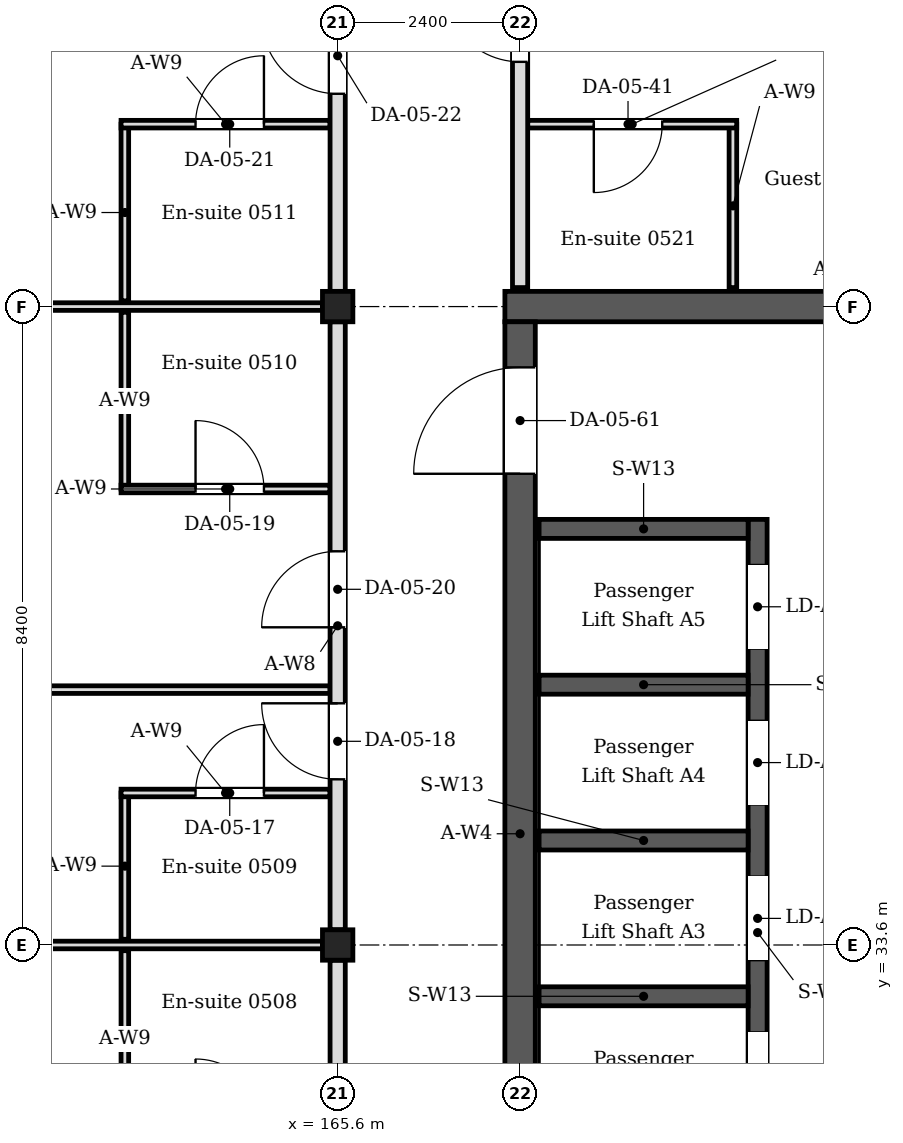
"""IFC4 building model, lengths in metres.
Left out: names, types, materials, properties, quantities, classifications, styles, units other than length and angle.
Written with IfcOpenShell. Run it as: python <this file> out.ifc"""

import sys

from ifc_helpers import new_model, si_unit, direction, frame, frame_2d, origin, origin_2d, place, context, subcontext, project, spatial, rectangle, i_section, extrude, element, fill, save


model = new_model("IFC4")
c1 = context("Model", 3, precision=1e-05, world=origin(), true_north=direction((0.0, 1.0)))
c2 = subcontext(c1, "Body", "Model", "MODEL_VIEW")
j1 = project(units=[si_unit("LENGTHUNIT", "METRE"), si_unit("PLANEANGLEUNIT", "RADIAN")], contexts=[c1])
p1 = place(None, origin())
s1 = spatial("IfcSite", under=j1, at=p1, CompositionType="ELEMENT")
p2 = place(p1, origin())
s2 = spatial("IfcBuilding", under=s1, at=p2, CompositionType="ELEMENT")
p3 = place(p2, frame((0.0, 0.0, 22.8)))
s3 = spatial("IfcBuildingStorey", under=s2, at=p3, CompositionType="ELEMENT", Elevation=22.8)
for number, where, z_axis, x_axis in (
    (1, (165.6, 33.6, 0.0), (0.0, 0.0, 1.0), (1.0, 0.0, 0.0)),
    (2, (165.6, 42.0, 0.0), (0.0, 0.0, 1.0), (1.0, 0.0, 0.0)),
):
    element("IfcColumn", number, at=place(p3, frame(where, z_axis=z_axis, x_axis=x_axis)), inside=s3, PredefinedType="COLUMN", context=c2, shape_type="SweptSolid", body=[
        extrude(i_section(OverallWidth=0.4, OverallDepth=0.4, WebThickness=0.013, FlangeThickness=0.021, FilletRadius=0.022, at=origin_2d()), origin(), (0.0, 0.0, 1.0), 4.2),
    ])
p4 = place(p3, frame((167.8, 42.0, 0.0), z_axis=(0.0, 0.0, 1.0), x_axis=(1.0, 0.0, 0.0)))
e3 = element("IfcWall", 3, at=p4, inside=s3, PredefinedType="SOLIDWALL", context=c2, shape_type="SweptSolid", body=[
    extrude(rectangle(XDim=8.8, YDim=0.4, at=frame_2d((4.4, 0.0))), origin(), (0.0, 0.0, 1.0), 4.05),
])
p5 = place(p3, frame((168.0, 25.4, 0.0), z_axis=(0.0, 0.0, 1.0), x_axis=(0.0, 1.0, 0.0)))
e4 = element("IfcWall", 4, at=p5, inside=s3, PredefinedType="SOLIDWALL", context=c2, shape_type="SweptSolid", body=[
    extrude(rectangle(XDim=16.4, YDim=0.4, at=frame_2d((8.2, 0.0))), origin(), (0.0, 0.0, 1.0), 4.05),
])
p6 = place(p5, frame((1.0, 0.0, 0.0)))
e5 = element("IfcOpeningElement", 5, at=p6, cuts=e4, PredefinedType="OPENING", context=c2, shape_type="SweptSolid", body=[
    extrude(rectangle(XDim=1.0, YDim=2.1, at=frame_2d((0.5, 1.05))), frame((0.0, 0.21, 0.0), z_axis=(0.0, -1.0, 0.0), x_axis=(1.0, 0.0, 0.0)), (0.0, 0.0, 1.0), 0.42),
])
p7 = place(p5, frame((14.4, 0.0, 0.0)))
e6 = element("IfcOpeningElement", 6, at=p7, cuts=e4, PredefinedType="OPENING", context=c2, shape_type="SweptSolid", body=[
    extrude(rectangle(XDim=1.4, YDim=2.1, at=frame_2d((0.7, 1.05))), frame((0.0, 0.21, 0.0), z_axis=(0.0, -1.0, 0.0), x_axis=(1.0, 0.0, 0.0)), (0.0, 0.0, 1.0), 0.42),
])
p8 = place(p3, frame((162.8, 31.2, 0.0), z_axis=(0.0, 0.0, 1.0), x_axis=(0.0, 1.0, 0.0)))
e7 = element("IfcWall", 7, at=p8, inside=s3, PredefinedType="PARTITIONING", context=c2, shape_type="SweptSolid", body=[
    extrude(rectangle(XDim=2.325, YDim=0.1, at=frame_2d((1.163, 0.0))), origin(), (0.0, 0.0, 1.0), 4.05),
])
p9 = place(p3, frame((162.8, 33.675, 0.0), z_axis=(0.0, 0.0, 1.0), x_axis=(0.0, 1.0, 0.0)))
e8 = element("IfcWall", 8, at=p9, inside=s3, PredefinedType="PARTITIONING", context=c2, shape_type="SweptSolid", body=[
    extrude(rectangle(XDim=1.925, YDim=0.1, at=frame_2d((0.962, 0.0))), origin(), (0.0, 0.0, 1.0), 4.05),
])
p10 = place(p3, frame((162.75, 35.6, 0.0), z_axis=(0.0, 0.0, 1.0), x_axis=(1.0, 0.0, 0.0)))
e9 = element("IfcWall", 9, at=p10, inside=s3, PredefinedType="PARTITIONING", context=c2, shape_type="SweptSolid", body=[
    extrude(rectangle(XDim=2.75, YDim=0.1, at=frame_2d((1.375, 0.0))), origin(), (0.0, 0.0, 1.0), 4.05),
])
p11 = place(p10, frame((0.98, 0.0, 0.0)))
e10 = element("IfcOpeningElement", 10, at=p11, cuts=e9, PredefinedType="OPENING", context=c2, shape_type="SweptSolid", body=[
    extrude(rectangle(XDim=0.9, YDim=2.1, at=frame_2d((0.45, 1.05))), frame((0.0, 0.06, 0.0), z_axis=(0.0, -1.0, 0.0), x_axis=(1.0, 0.0, 0.0)), (0.0, 0.0, 1.0), 0.12),
])
p12 = place(p3, frame((162.8, 39.6, 0.0), z_axis=(0.0, 0.0, 1.0), x_axis=(0.0, 1.0, 0.0)))
e11 = element("IfcWall", 11, at=p12, inside=s3, PredefinedType="PARTITIONING", context=c2, shape_type="SweptSolid", body=[
    extrude(rectangle(XDim=2.325, YDim=0.1, at=frame_2d((1.163, 0.0))), origin(), (0.0, 0.0, 1.0), 4.05),
])
p13 = place(p3, frame((162.75, 39.6, 0.0), z_axis=(0.0, 0.0, 1.0), x_axis=(1.0, 0.0, 0.0)))
e12 = element("IfcWall", 12, at=p13, inside=s3, PredefinedType="PARTITIONING", context=c2, shape_type="SweptSolid", body=[
    extrude(rectangle(XDim=2.75, YDim=0.1, at=frame_2d((1.375, 0.0))), origin(), (0.0, 0.0, 1.0), 4.05),
])
p14 = place(p13, frame((0.98, 0.0, 0.0)))
e13 = element("IfcOpeningElement", 13, at=p14, cuts=e12, PredefinedType="OPENING", context=c2, shape_type="SweptSolid", body=[
    extrude(rectangle(XDim=0.9, YDim=2.1, at=frame_2d((0.45, 1.05))), frame((0.0, 0.06, 0.0), z_axis=(0.0, -1.0, 0.0), x_axis=(1.0, 0.0, 0.0)), (0.0, 0.0, 1.0), 0.12),
])
p15 = place(p3, frame((162.8, 42.075, 0.0), z_axis=(0.0, 0.0, 1.0), x_axis=(0.0, 1.0, 0.0)))
e14 = element("IfcWall", 14, at=p15, inside=s3, PredefinedType="PARTITIONING", context=c2, shape_type="SweptSolid", body=[
    extrude(rectangle(XDim=2.325, YDim=0.1, at=frame_2d((1.163, 0.0))), origin(), (0.0, 0.0, 1.0), 4.05),
])
p16 = place(p3, frame((162.75, 44.4, 0.0), z_axis=(0.0, 0.0, 1.0), x_axis=(1.0, 0.0, 0.0)))
e15 = element("IfcWall", 15, at=p16, inside=s3, PredefinedType="PARTITIONING", context=c2, shape_type="SweptSolid", body=[
    extrude(rectangle(XDim=2.75, YDim=0.1, at=frame_2d((1.375, 0.0))), origin(), (0.0, 0.0, 1.0), 4.05),
])
p17 = place(p16, frame((0.98, 0.0, 0.0)))
e16 = element("IfcOpeningElement", 16, at=p17, cuts=e15, PredefinedType="OPENING", context=c2, shape_type="SweptSolid", body=[
    extrude(rectangle(XDim=0.9, YDim=2.1, at=frame_2d((0.45, 1.05))), frame((0.0, 0.06, 0.0), z_axis=(0.0, -1.0, 0.0), x_axis=(1.0, 0.0, 0.0)), (0.0, 0.0, 1.0), 0.12),
])
p18 = place(p3, frame((170.8, 42.25, 0.0), z_axis=(0.0, 0.0, 1.0), x_axis=(0.0, 1.0, 0.0)))
e17 = element("IfcWall", 17, at=p18, inside=s3, PredefinedType="PARTITIONING", context=c2, shape_type="SweptSolid", body=[
    extrude(rectangle(XDim=2.15, YDim=0.1, at=frame_2d((1.075, 0.0))), origin(), (0.0, 0.0, 1.0), 4.05),
])
p19 = place(p3, frame((170.85, 44.4, 0.0), z_axis=(0.0, 0.0, 1.0), x_axis=(-1.0, 0.0, 0.0)))
e18 = element("IfcWall", 18, at=p19, inside=s3, PredefinedType="PARTITIONING", context=c2, shape_type="SweptSolid", body=[
    extrude(rectangle(XDim=2.75, YDim=0.1, at=frame_2d((1.375, 0.0))), origin(), (0.0, 0.0, 1.0), 4.05),
])
p20 = place(p19, frame((0.98, 0.0, 0.0)))
e19 = element("IfcOpeningElement", 19, at=p20, cuts=e18, PredefinedType="OPENING", context=c2, shape_type="SweptSolid", body=[
    extrude(rectangle(XDim=0.9, YDim=2.1, at=frame_2d((0.45, 1.05))), frame((0.0, 0.06, 0.0), z_axis=(0.0, -1.0, 0.0), x_axis=(1.0, 0.0, 0.0)), (0.0, 0.0, 1.0), 0.12),
])
for number, where, z_axis, x_axis in (
    (20, (157.4, 33.6, 0.0), (0.0, 0.0, 1.0), (1.0, 0.0, 0.0)),
    (21, (157.4, 42.0, 0.0), (0.0, 0.0, 1.0), (1.0, 0.0, 0.0)),
):
    element("IfcWall", number, at=place(p3, frame(where, z_axis=z_axis, x_axis=x_axis)), inside=s3, PredefinedType="PARTITIONING", context=c2, shape_type="SweptSolid", body=[
        extrude(rectangle(XDim=8.0, YDim=0.1, at=frame_2d((4.0, 0.0))), origin(), (0.0, 0.0, 1.0), 3.604),
    ])
p21 = place(p3, frame((156.98, 36.96, 0.0), z_axis=(0.0, 0.0, 1.0), x_axis=(1.0, 0.0, 0.0)))
e22 = element("IfcWall", 22, at=p21, inside=s3, PredefinedType="PARTITIONING", context=c2, shape_type="SweptSolid", body=[
    extrude(rectangle(XDim=8.52, YDim=0.1, at=frame_2d((4.26, 0.0))), origin(), (0.0, 0.0, 1.0), 3.604),
])
p22 = place(p3, frame((165.6, 25.4, 0.0), z_axis=(0.0, 0.0, 1.0), x_axis=(0.0, 1.0, 0.0)))
e23 = element("IfcWall", 23, at=p22, inside=s3, PredefinedType="PARTITIONING", context=c2, shape_type="SweptSolid", body=[
    extrude(rectangle(XDim=8.0, YDim=0.2, at=frame_2d((4.0, 0.0))), origin(), (0.0, 0.0, 1.0), 3.45),
])
p23 = place(p22, frame((1.98, 0.0, 0.0)))
e24 = element("IfcOpeningElement", 24, at=p23, cuts=e23, PredefinedType="OPENING", context=c2, shape_type="SweptSolid", body=[
    extrude(rectangle(XDim=1.0, YDim=2.4, at=frame_2d((0.5, 1.2))), frame((0.0, 0.11, 0.0), z_axis=(0.0, -1.0, 0.0), x_axis=(1.0, 0.0, 0.0)), (0.0, 0.0, 1.0), 0.22),
])
p24 = place(p22, frame((3.98, 0.0, 0.0)))
e25 = element("IfcOpeningElement", 25, at=p24, cuts=e23, PredefinedType="OPENING", context=c2, shape_type="SweptSolid", body=[
    extrude(rectangle(XDim=1.0, YDim=2.4, at=frame_2d((0.5, 1.2))), frame((0.0, 0.11, 0.0), z_axis=(0.0, -1.0, 0.0), x_axis=(1.0, 0.0, 0.0)), (0.0, 0.0, 1.0), 0.22),
])
p25 = place(p3, frame((165.6, 33.8, 0.0), z_axis=(0.0, 0.0, 1.0), x_axis=(0.0, 1.0, 0.0)))
e26 = element("IfcWall", 26, at=p25, inside=s3, PredefinedType="PARTITIONING", context=c2, shape_type="SweptSolid", body=[
    extrude(rectangle(XDim=8.0, YDim=0.2, at=frame_2d((4.0, 0.0))), origin(), (0.0, 0.0, 1.0), 3.45),
])
p26 = place(p25, frame((1.98, 0.0, 0.0)))
e27 = element("IfcOpeningElement", 27, at=p26, cuts=e26, PredefinedType="OPENING", context=c2, shape_type="SweptSolid", body=[
    extrude(rectangle(XDim=1.0, YDim=2.4, at=frame_2d((0.5, 1.2))), frame((0.0, 0.11, 0.0), z_axis=(0.0, -1.0, 0.0), x_axis=(1.0, 0.0, 0.0)), (0.0, 0.0, 1.0), 0.22),
])
p27 = place(p25, frame((3.98, 0.0, 0.0)))
e28 = element("IfcOpeningElement", 28, at=p27, cuts=e26, PredefinedType="OPENING", context=c2, shape_type="SweptSolid", body=[
    extrude(rectangle(XDim=1.0, YDim=2.4, at=frame_2d((0.5, 1.2))), frame((0.0, 0.11, 0.0), z_axis=(0.0, -1.0, 0.0), x_axis=(1.0, 0.0, 0.0)), (0.0, 0.0, 1.0), 0.22),
])
p28 = place(p3, frame((165.6, 42.2, 0.0), z_axis=(0.0, 0.0, 1.0), x_axis=(0.0, 1.0, 0.0)))
e29 = element("IfcWall", 29, at=p28, inside=s3, PredefinedType="PARTITIONING", context=c2, shape_type="SweptSolid", body=[
    extrude(rectangle(XDim=8.0, YDim=0.2, at=frame_2d((4.0, 0.0))), origin(), (0.0, 0.0, 1.0), 3.45),
])
p29 = place(p28, frame((2.6, 0.0, 0.0)))
e30 = element("IfcOpeningElement", 30, at=p29, cuts=e29, PredefinedType="OPENING", context=c2, shape_type="SweptSolid", body=[
    extrude(rectangle(XDim=1.0, YDim=2.4, at=frame_2d((0.5, 1.2))), frame((0.0, 0.11, 0.0), z_axis=(0.0, -1.0, 0.0), x_axis=(1.0, 0.0, 0.0)), (0.0, 0.0, 1.0), 0.22),
])
p30 = place(p28, frame((4.4, 0.0, 0.0)))
e31 = element("IfcOpeningElement", 31, at=p30, cuts=e29, PredefinedType="OPENING", context=c2, shape_type="SweptSolid", body=[
    extrude(rectangle(XDim=1.0, YDim=2.4, at=frame_2d((0.5, 1.2))), frame((0.0, 0.11, 0.0), z_axis=(0.0, -1.0, 0.0), x_axis=(1.0, 0.0, 0.0)), (0.0, 0.0, 1.0), 0.22),
])
p31 = place(p3, frame((168.0, 42.25, 0.0), z_axis=(0.0, 0.0, 1.0), x_axis=(0.0, 1.0, 0.0)))
e32 = element("IfcWall", 32, at=p31, inside=s3, PredefinedType="PARTITIONING", context=c2, shape_type="SweptSolid", body=[
    extrude(rectangle(XDim=7.95, YDim=0.2, at=frame_2d((3.975, 0.0))), origin(), (0.0, 0.0, 1.0), 3.45),
])
p32 = place(p31, frame((2.97, 0.0, 0.0)))
e33 = element("IfcOpeningElement", 33, at=p32, cuts=e32, PredefinedType="OPENING", context=c2, shape_type="SweptSolid", body=[
    extrude(rectangle(XDim=1.0, YDim=2.4, at=frame_2d((0.5, 1.2))), frame((0.0, 0.11, 0.0), z_axis=(0.0, -1.0, 0.0), x_axis=(1.0, 0.0, 0.0)), (0.0, 0.0, 1.0), 0.22),
])
p33 = place(p31, frame((4.97, 0.0, 0.0)))
e34 = element("IfcOpeningElement", 34, at=p33, cuts=e32, PredefinedType="OPENING", context=c2, shape_type="SweptSolid", body=[
    extrude(rectangle(XDim=1.0, YDim=2.4, at=frame_2d((0.5, 1.2))), frame((0.0, 0.11, 0.0), z_axis=(0.0, -1.0, 0.0), x_axis=(1.0, 0.0, 0.0)), (0.0, 0.0, 1.0), 0.22),
])
p34 = place(p3, frame((171.125, 28.3, 0.0), z_axis=(0.0, 0.0, 1.0), x_axis=(0.0, 1.0, 0.0)))
e35 = element("IfcWall", 35, at=p34, inside=s3, PredefinedType="SOLIDWALL", context=c2, shape_type="SweptSolid", body=[
    extrude(rectangle(XDim=10.9, YDim=0.25, at=frame_2d((5.45, 0.0))), origin(), (0.0, 0.0, 1.0), 4.05),
])
p35 = place(p34, frame((0.8, 0.0, 0.0)))
e36 = element("IfcOpeningElement", 36, at=p35, cuts=e35, PredefinedType="OPENING", context=c2, shape_type="SweptSolid", body=[
    extrude(rectangle(XDim=1.1, YDim=2.1, at=frame_2d((0.55, 1.05))), frame((0.0, 0.135, 0.0), z_axis=(0.0, -1.0, 0.0), x_axis=(1.0, 0.0, 0.0)), (0.0, 0.0, 1.0), 0.27),
])
p36 = place(p34, frame((3.05, 0.0, 0.0)))
e37 = element("IfcOpeningElement", 37, at=p36, cuts=e35, PredefinedType="OPENING", context=c2, shape_type="SweptSolid", body=[
    extrude(rectangle(XDim=1.1, YDim=2.1, at=frame_2d((0.55, 1.05))), frame((0.0, 0.135, 0.0), z_axis=(0.0, -1.0, 0.0), x_axis=(1.0, 0.0, 0.0)), (0.0, 0.0, 1.0), 0.27),
])
p37 = place(p34, frame((5.1, 0.0, 0.0)))
e38 = element("IfcOpeningElement", 38, at=p37, cuts=e35, PredefinedType="OPENING", context=c2, shape_type="SweptSolid", body=[
    extrude(rectangle(XDim=1.1, YDim=2.1, at=frame_2d((0.55, 1.05))), frame((0.0, 0.135, 0.0), z_axis=(0.0, -1.0, 0.0), x_axis=(1.0, 0.0, 0.0)), (0.0, 0.0, 1.0), 0.27),
])
p38 = place(p34, frame((7.15, 0.0, 0.0)))
e39 = element("IfcOpeningElement", 39, at=p38, cuts=e35, PredefinedType="OPENING", context=c2, shape_type="SweptSolid", body=[
    extrude(rectangle(XDim=1.1, YDim=2.1, at=frame_2d((0.55, 1.05))), frame((0.0, 0.135, 0.0), z_axis=(0.0, -1.0, 0.0), x_axis=(1.0, 0.0, 0.0)), (0.0, 0.0, 1.0), 0.27),
])
p39 = place(p34, frame((9.2, 0.0, 0.0)))
e40 = element("IfcOpeningElement", 40, at=p39, cuts=e35, PredefinedType="OPENING", context=c2, shape_type="SweptSolid", body=[
    extrude(rectangle(XDim=1.1, YDim=2.1, at=frame_2d((0.55, 1.05))), frame((0.0, 0.135, 0.0), z_axis=(0.0, -1.0, 0.0), x_axis=(1.0, 0.0, 0.0)), (0.0, 0.0, 1.0), 0.27),
])
for number, where, z_axis, x_axis in (
    (41, (168.25, 32.925, 0.0), (0.0, 0.0, 1.0), (1.0, 0.0, 0.0)),
    (42, (168.25, 34.975, 0.0), (0.0, 0.0, 1.0), (1.0, 0.0, 0.0)),
    (43, (168.25, 37.025, 0.0), (0.0, 0.0, 1.0), (1.0, 0.0, 0.0)),
    (44, (168.25, 39.075, 0.0), (0.0, 0.0, 1.0), (1.0, 0.0, 0.0)),
):
    element("IfcWall", number, at=place(p3, frame(where, z_axis=z_axis, x_axis=x_axis)), inside=s3, PredefinedType="SOLIDWALL", context=c2, shape_type="SweptSolid", body=[
        extrude(rectangle(XDim=2.75, YDim=0.25, at=frame_2d((1.375, 0.0))), origin(), (0.0, 0.0, 1.0), 4.05),
    ])
p40 = place(p11, origin())
e45 = element("IfcDoor", 45, at=p40, inside=s3, OperationType="SINGLE_SWING_RIGHT", PredefinedType="DOOR", context=c2, shape_type="SweptSolid", body=[
    extrude(rectangle(XDim=0.9, YDim=2.1, at=frame_2d((0.45, 1.05))), frame((0.0, 0.025, 0.0), z_axis=(0.0, -1.0, 0.0), x_axis=(1.0, 0.0, 0.0)), (0.0, 0.0, 1.0), 0.05),
])
fill(e10, e45)
p41 = place(p26, origin())
e46 = element("IfcDoor", 46, at=p41, inside=s3, OperationType="SINGLE_SWING_RIGHT", PredefinedType="DOOR", context=c2, shape_type="SweptSolid", body=[
    extrude(rectangle(XDim=1.0, YDim=2.4, at=frame_2d((0.5, 1.2))), frame((0.0, 0.025, 0.0), z_axis=(0.0, -1.0, 0.0), x_axis=(1.0, 0.0, 0.0)), (0.0, 0.0, 1.0), 0.05),
])
fill(e27, e46)
p42 = place(p14, origin())
e47 = element("IfcDoor", 47, at=p42, inside=s3, OperationType="SINGLE_SWING_LEFT", PredefinedType="DOOR", context=c2, shape_type="SweptSolid", body=[
    extrude(rectangle(XDim=0.9, YDim=2.1, at=frame_2d((0.45, 1.05))), frame((0.0, 0.025, 0.0), z_axis=(0.0, -1.0, 0.0), x_axis=(1.0, 0.0, 0.0)), (0.0, 0.0, 1.0), 0.05),
])
fill(e13, e47)
p43 = place(p27, origin())
e48 = element("IfcDoor", 48, at=p43, inside=s3, OperationType="SINGLE_SWING_LEFT", PredefinedType="DOOR", context=c2, shape_type="SweptSolid", body=[
    extrude(rectangle(XDim=1.0, YDim=2.4, at=frame_2d((0.5, 1.2))), frame((0.0, 0.025, 0.0), z_axis=(0.0, -1.0, 0.0), x_axis=(1.0, 0.0, 0.0)), (0.0, 0.0, 1.0), 0.05),
])
fill(e28, e48)
p44 = place(p17, origin())
e49 = element("IfcDoor", 49, at=p44, inside=s3, OperationType="SINGLE_SWING_RIGHT", PredefinedType="DOOR", context=c2, shape_type="SweptSolid", body=[
    extrude(rectangle(XDim=0.9, YDim=2.1, at=frame_2d((0.45, 1.05))), frame((0.0, 0.025, 0.0), z_axis=(0.0, -1.0, 0.0), x_axis=(1.0, 0.0, 0.0)), (0.0, 0.0, 1.0), 0.05),
])
fill(e16, e49)
p45 = place(p29, origin())
e50 = element("IfcDoor", 50, at=p45, inside=s3, OperationType="SINGLE_SWING_RIGHT", PredefinedType="DOOR", context=c2, shape_type="SweptSolid", body=[
    extrude(rectangle(XDim=1.0, YDim=2.4, at=frame_2d((0.5, 1.2))), frame((0.0, 0.025, 0.0), z_axis=(0.0, -1.0, 0.0), x_axis=(1.0, 0.0, 0.0)), (0.0, 0.0, 1.0), 0.05),
])
fill(e30, e50)
p46 = place(p20, origin())
e51 = element("IfcDoor", 51, at=p46, inside=s3, OperationType="SINGLE_SWING_RIGHT", PredefinedType="DOOR", context=c2, shape_type="SweptSolid", body=[
    extrude(rectangle(XDim=0.9, YDim=2.1, at=frame_2d((0.45, 1.05))), frame((0.0, 0.025, 0.0), z_axis=(0.0, -1.0, 0.0), x_axis=(1.0, 0.0, 0.0)), (0.0, 0.0, 1.0), 0.05),
])
fill(e19, e51)
p47 = place(p32, origin())
e52 = element("IfcDoor", 52, at=p47, inside=s3, OperationType="SINGLE_SWING_RIGHT", PredefinedType="DOOR", context=c2, shape_type="SweptSolid", body=[
    extrude(rectangle(XDim=1.0, YDim=2.4, at=frame_2d((0.5, 1.2))), frame((0.0, 0.025, 0.0), z_axis=(0.0, -1.0, 0.0), x_axis=(1.0, 0.0, 0.0)), (0.0, 0.0, 1.0), 0.05),
])
fill(e33, e52)
p48 = place(p36, origin())
e53 = element("IfcDoor", 53, at=p48, inside=s3, OperationType="SLIDING_TO_LEFT", PredefinedType="DOOR", context=c2, shape_type="SweptSolid", body=[
    extrude(rectangle(XDim=1.1, YDim=2.1, at=frame_2d((0.55, 1.05))), frame((0.0, 0.025, 0.0), z_axis=(0.0, -1.0, 0.0), x_axis=(1.0, 0.0, 0.0)), (0.0, 0.0, 1.0), 0.05),
])
fill(e37, e53)
p49 = place(p37, origin())
e54 = element("IfcDoor", 54, at=p49, inside=s3, OperationType="SLIDING_TO_LEFT", PredefinedType="DOOR", context=c2, shape_type="SweptSolid", body=[
    extrude(rectangle(XDim=1.1, YDim=2.1, at=frame_2d((0.55, 1.05))), frame((0.0, 0.025, 0.0), z_axis=(0.0, -1.0, 0.0), x_axis=(1.0, 0.0, 0.0)), (0.0, 0.0, 1.0), 0.05),
])
fill(e38, e54)
p50 = place(p38, origin())
e55 = element("IfcDoor", 55, at=p50, inside=s3, OperationType="SLIDING_TO_LEFT", PredefinedType="DOOR", context=c2, shape_type="SweptSolid", body=[
    extrude(rectangle(XDim=1.1, YDim=2.1, at=frame_2d((0.55, 1.05))), frame((0.0, 0.025, 0.0), z_axis=(0.0, -1.0, 0.0), x_axis=(1.0, 0.0, 0.0)), (0.0, 0.0, 1.0), 0.05),
])
fill(e39, e55)
p51 = place(p39, origin())
e56 = element("IfcDoor", 56, at=p51, inside=s3, OperationType="SLIDING_TO_LEFT", PredefinedType="DOOR", context=c2, shape_type="SweptSolid", body=[
    extrude(rectangle(XDim=1.1, YDim=2.1, at=frame_2d((0.55, 1.05))), frame((0.0, 0.025, 0.0), z_axis=(0.0, -1.0, 0.0), x_axis=(1.0, 0.0, 0.0)), (0.0, 0.0, 1.0), 0.05),
])
fill(e40, e56)
p52 = place(p7, origin())
e57 = element("IfcDoor", 57, at=p52, inside=s3, OperationType="DOUBLE_DOOR_DOUBLE_SWING", PredefinedType="DOOR", context=c2, shape_type="SweptSolid", body=[
    extrude(rectangle(XDim=1.4, YDim=2.1, at=frame_2d((0.7, 1.05))), frame((0.0, 0.025, 0.0), z_axis=(0.0, -1.0, 0.0), x_axis=(1.0, 0.0, 0.0)), (0.0, 0.0, 1.0), 0.05),
])
fill(e6, e57)
save(model, sys.argv[1])
